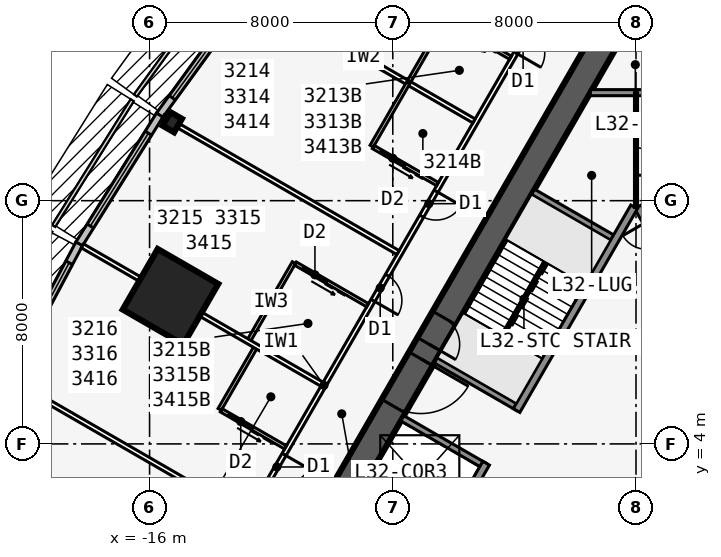
"""IFC4 building model, lengths in metres.
Left out: names, types, materials, properties, quantities, classifications, styles, units other than length and angle.
Written with IfcOpenShell. Run it as: python <this file> out.ifc"""

import sys

from ifc_helpers import new_model, si_unit, direction, frame, frame_2d, origin, origin_2d, place, context, subcontext, project, spatial, rectangle, i_section, extrude, element, fill, save


model = new_model("IFC4")
c1 = context("Model", 3, precision=1e-05, world=origin(), true_north=direction((0.0, 1.0)))
c2 = subcontext(c1, "Body", "Model", "MODEL_VIEW")
j1 = project(units=[si_unit("LENGTHUNIT", "METRE"), si_unit("PLANEANGLEUNIT", "RADIAN")], contexts=[c1])
p1 = place(None, origin())
s1 = spatial("IfcSite", under=j1, at=p1, CompositionType="ELEMENT")
p2 = place(p1, origin())
s2 = spatial("IfcBuilding", under=s1, at=p2, CompositionType="ELEMENT")
p3 = place(p2, frame((0.0, 0.0, 124.9)))
s3 = spatial("IfcBuildingStorey", under=s2, at=p3, CompositionType="ELEMENT", Elevation=124.9)
p4 = place(p3, frame((16.5, -9.526, 0.0), z_axis=(0.0, 0.0, 1.0), x_axis=(-0.499999749417, 0.866025548458, 0.0)))
e1 = element("IfcWall", 1, at=p4, inside=s3, PredefinedType="SHEAR", context=c2, shape_type="SweptSolid", body=[
    extrude(rectangle(XDim=33.0, YDim=0.9, at=frame_2d((16.5, 0.0))), origin(), (0.0, 0.0, 1.0), 3.4),
])
p5 = place(p4, frame((14.15, 0.0, 0.0)))
e2 = element("IfcOpeningElement", 2, at=p5, cuts=e1, PredefinedType="OPENING", context=c2, shape_type="SweptSolid", body=[
    extrude(rectangle(XDim=1.8, YDim=2.13, at=frame_2d((0.9, 1.065))), frame((0.0, 0.46, 0.0), z_axis=(0.0, -1.0, 0.0), x_axis=(1.0, 0.0, 0.0)), (0.0, 0.0, 1.0), 0.92),
])
p6 = place(p4, frame((12.6, 0.0, 0.0)))
e3 = element("IfcOpeningElement", 3, at=p6, cuts=e1, PredefinedType="OPENING", context=c2, shape_type="SweptSolid", body=[
    extrude(rectangle(XDim=1.0, YDim=2.13, at=frame_2d((0.5, 1.065))), frame((0.0, 0.46, 0.0), z_axis=(0.0, -1.0, 0.0), x_axis=(1.0, 0.0, 0.0)), (0.0, 0.0, 1.0), 0.92),
])
p7 = place(p3, frame((5.379, 2.586, 0.0), z_axis=(0.0, 0.0, 1.0), x_axis=(-0.500001375892, 0.866024609411, 0.0)))
e4 = element("IfcWall", 4, at=p7, inside=s3, PredefinedType="SOLIDWALL", context=c2, shape_type="SweptSolid", body=[
    extrude(rectangle(XDim=10.633, YDim=0.25, at=frame_2d((5.316, 0.0))), origin(), (0.0, 0.0, 1.0), 3.235),
])
p8 = place(p7, frame((9.164, 0.0, 0.0)))
e5 = element("IfcOpeningElement", 5, at=p8, cuts=e4, PredefinedType="OPENING", context=c2, shape_type="SweptSolid", body=[
    extrude(rectangle(XDim=0.9, YDim=2.13, at=frame_2d((0.45, 1.065))), frame((0.0, 0.135, 0.0), z_axis=(0.0, -1.0, 0.0), x_axis=(1.0, 0.0, 0.0)), (0.0, 0.0, 1.0), 0.27),
])
p9 = place(p7, frame((1.0, 0.0, 0.0)))
e6 = element("IfcOpeningElement", 6, at=p9, cuts=e4, PredefinedType="OPENING", context=c2, shape_type="SweptSolid", body=[
    extrude(rectangle(XDim=1.1, YDim=2.13, at=frame_2d((0.55, 1.065))), frame((0.0, 0.135, 0.0), z_axis=(0.0, -1.0, 0.0), x_axis=(1.0, 0.0, 0.0)), (0.0, 0.0, 1.0), 0.27),
])
p10 = place(p7, frame((3.9, 0.0, 0.0)))
e7 = element("IfcOpeningElement", 7, at=p10, cuts=e4, PredefinedType="OPENING", context=c2, shape_type="SweptSolid", body=[
    extrude(rectangle(XDim=1.1, YDim=2.13, at=frame_2d((0.55, 1.065))), frame((0.0, 0.135, 0.0), z_axis=(0.0, -1.0, 0.0), x_axis=(1.0, 0.0, 0.0)), (0.0, 0.0, 1.0), 0.27),
])
p11 = place(p7, frame((6.8, 0.0, 0.0)))
e8 = element("IfcOpeningElement", 8, at=p11, cuts=e4, PredefinedType="OPENING", context=c2, shape_type="SweptSolid", body=[
    extrude(rectangle(XDim=1.1, YDim=2.13, at=frame_2d((0.55, 1.065))), frame((0.0, 0.135, 0.0), z_axis=(0.0, -1.0, 0.0), x_axis=(1.0, 0.0, 0.0)), (0.0, 0.0, 1.0), 0.27),
])
p12 = place(p3, frame((0.0, 19.052, 0.0), z_axis=(0.0, 0.0, 1.0), x_axis=(-0.499999749417, -0.866025548458, 0.0)))
e9 = element("IfcWall", 9, at=p12, inside=s3, PredefinedType="SHEAR", context=c2, shape_type="SweptSolid", body=[
    extrude(rectangle(XDim=33.0, YDim=0.9, at=frame_2d((16.5, 0.0))), origin(), (0.0, 0.0, 1.0), 3.4),
])
p13 = place(p12, frame((14.15, 0.0, 0.0)))
e10 = element("IfcOpeningElement", 10, at=p13, cuts=e9, PredefinedType="OPENING", context=c2, shape_type="SweptSolid", body=[
    extrude(rectangle(XDim=1.8, YDim=2.13, at=frame_2d((0.9, 1.065))), frame((0.0, 0.46, 0.0), z_axis=(0.0, -1.0, 0.0), x_axis=(1.0, 0.0, 0.0)), (0.0, 0.0, 1.0), 0.92),
])
p14 = place(p12, frame((12.6, 0.0, 0.0)))
e11 = element("IfcOpeningElement", 11, at=p14, cuts=e9, PredefinedType="OPENING", context=c2, shape_type="SweptSolid", body=[
    extrude(rectangle(XDim=1.0, YDim=2.13, at=frame_2d((0.5, 1.065))), frame((0.0, 0.46, 0.0), z_axis=(0.0, -1.0, 0.0), x_axis=(1.0, 0.0, 0.0)), (0.0, 0.0, 1.0), 0.92),
])
p15 = place(p3, frame((-0.062, 11.794, 0.0), z_axis=(0.0, 0.0, 1.0), x_axis=(-0.500006680225, -0.86602154692, 0.0)))
e12 = element("IfcWall", 12, at=p15, inside=s3, PredefinedType="SOLIDWALL", context=c2, shape_type="SweptSolid", body=[
    extrude(rectangle(XDim=7.733, YDim=0.25, at=frame_2d((3.866, 0.0))), origin(), (0.0, 0.0, 1.0), 3.235),
])
p16 = place(p3, frame((-4.929, 3.365, 0.0), z_axis=(0.0, 0.0, 1.0), x_axis=(-0.499991433582, -0.866030349552, 0.0)))
e13 = element("IfcWall", 13, at=p16, inside=s3, PredefinedType="SOLIDWALL", context=c2, shape_type="SweptSolid", body=[
    extrude(rectangle(XDim=10.633, YDim=0.25, at=frame_2d((5.316, 0.0))), origin(), (0.0, 0.0, 1.0), 3.235),
])
p17 = place(p16, frame((9.164, 0.0, 0.0)))
e14 = element("IfcOpeningElement", 14, at=p17, cuts=e13, PredefinedType="OPENING", context=c2, shape_type="SweptSolid", body=[
    extrude(rectangle(XDim=0.9, YDim=2.13, at=frame_2d((0.45, 1.065))), frame((0.0, 0.135, 0.0), z_axis=(0.0, -1.0, 0.0), x_axis=(1.0, 0.0, 0.0)), (0.0, 0.0, 1.0), 0.27),
])
for number, where, z_axis, x_axis in (
    (15, (-0.679, 10.727, 0.0), (0.0, 0.0, 1.0), (-0.866, 0.5, 0.0)),
    (16, (-3.879, 5.184, 0.0), (0.0, 0.0, 1.0), (-0.866, 0.5, 0.0)),
    (17, (-4.979, 3.279, 0.0), (0.0, 0.0, 1.0), (-0.866, 0.5, 0.0)),
):
    element("IfcWall", number, at=place(p3, frame(where, z_axis=z_axis, x_axis=x_axis)), inside=s3, PredefinedType="SOLIDWALL", context=c2, shape_type="SweptSolid", body=[
        extrude(rectangle(XDim=3.125, YDim=0.2, at=frame_2d((1.562, 0.0))), origin(), (0.0, 0.0, 1.0), 3.235),
    ])
p18 = place(p3, frame((-15.254, 14.58, 0.0), z_axis=(0.0, 0.0, 1.0), x_axis=(-0.866025403784, 0.5, 0.0)))
e18 = element("IfcColumn", 18, at=p18, inside=s3, PredefinedType="COLUMN", context=c2, shape_type="SweptSolid", body=[
    extrude(i_section(OverallWidth=0.437, OverallDepth=0.513, WebThickness=0.061, FlangeThickness=0.097, at=origin_2d()), origin(), (0.0, 0.0, 1.0), 3.4),
])
p19 = place(p3, frame((-15.312, 8.84, 0.0), z_axis=(0.0, 0.0, 1.0), x_axis=(-0.866025403784, 0.5, 0.0)))
e19 = element("IfcColumn", 19, at=p19, inside=s3, PredefinedType="COLUMN", context=c2, shape_type="SweptSolid", body=[
    extrude(rectangle(XDim=2.3, YDim=2.3, at=origin_2d()), origin(), (0.0, 0.0, 1.0), 3.4),
])
p20 = place(p3, frame((-12.718, 18.875, 0.0), z_axis=(0.0, 0.0, 1.0), x_axis=(-0.587669188412, -0.809101307001, 0.0)))
e20 = element("IfcWall", 20, at=p20, inside=s3, PredefinedType="STANDARD", context=c2, shape_type="SweptSolid", body=[
    extrude(rectangle(XDim=5.028, YDim=0.25, at=frame_2d((2.514, 0.0))), origin(), (0.0, 0.0, 1.0), 3.235),
])
p21 = place(p20, frame((0.714, 0.0, 0.45)))
e21 = element("IfcOpeningElement", 21, at=p21, cuts=e20, PredefinedType="OPENING", context=c2, shape_type="SweptSolid", body=[
    extrude(rectangle(XDim=3.6, YDim=2.4, at=frame_2d((1.8, 1.2))), frame((0.0, 0.135, 0.0), z_axis=(0.0, -1.0, 0.0), x_axis=(1.0, 0.0, 0.0)), (0.0, 0.0, 1.0), 0.27),
])
p22 = place(p3, frame((-15.667, 14.814, 0.0), z_axis=(0.0, 0.0, 1.0), x_axis=(-0.529990167382, -0.84800378683, 0.0)))
e22 = element("IfcWall", 22, at=p22, inside=s3, PredefinedType="STANDARD", context=c2, shape_type="SweptSolid", body=[
    extrude(rectangle(XDim=5.003, YDim=0.25, at=frame_2d((2.501, 0.0))), origin(), (0.0, 0.0, 1.0), 3.235),
])
p23 = place(p22, frame((0.701, 0.0, 0.45)))
e23 = element("IfcOpeningElement", 23, at=p23, cuts=e22, PredefinedType="OPENING", context=c2, shape_type="SweptSolid", body=[
    extrude(rectangle(XDim=3.6, YDim=2.4, at=frame_2d((1.8, 1.2))), frame((0.0, 0.135, 0.0), z_axis=(0.0, -1.0, 0.0), x_axis=(1.0, 0.0, 0.0)), (0.0, 0.0, 1.0), 0.27),
])
p24 = place(p3, frame((-18.314, 10.579, 0.0), z_axis=(0.0, 0.0, 1.0), x_axis=(-0.469404966864, -0.882982999317, 0.0)))
e24 = element("IfcWall", 24, at=p24, inside=s3, PredefinedType="STANDARD", context=c2, shape_type="SweptSolid", body=[
    extrude(rectangle(XDim=5.003, YDim=0.25, at=frame_2d((2.501, 0.0))), origin(), (0.0, 0.0, 1.0), 3.235),
])
p25 = place(p24, frame((0.701, 0.0, 0.45)))
e25 = element("IfcOpeningElement", 25, at=p25, cuts=e24, PredefinedType="OPENING", context=c2, shape_type="SweptSolid", body=[
    extrude(rectangle(XDim=3.6, YDim=2.4, at=frame_2d((1.8, 1.2))), frame((0.0, 0.135, 0.0), z_axis=(0.0, -1.0, 0.0), x_axis=(1.0, 0.0, 0.0)), (0.0, 0.0, 1.0), 0.27),
])
p26 = place(p3, frame((-0.5, 22.836, 0.0), z_axis=(0.0, 0.0, 1.0), x_axis=(-0.500001677587, -0.866024435227, 0.0)))
e26 = element("IfcWall", 26, at=p26, inside=s3, PredefinedType="PARTITIONING", context=c2, shape_type="SweptSolid", body=[
    extrude(rectangle(XDim=39.054, YDim=0.15, at=frame_2d((19.527, 0.0))), origin(), (0.0, 0.0, 1.0), 3.235),
])
p27 = place(p26, frame((0.352, 0.0, 0.0)))
e27 = element("IfcOpeningElement", 27, at=p27, cuts=e26, PredefinedType="OPENING", context=c2, shape_type="SweptSolid", body=[
    extrude(rectangle(XDim=0.95, YDim=2.13, at=frame_2d((0.475, 1.065))), frame((0.0, 0.085, 0.0), z_axis=(0.0, -1.0, 0.0), x_axis=(1.0, 0.0, 0.0)), (0.0, 0.0, 1.0), 0.17),
])
p28 = place(p26, frame((5.952, 0.0, 0.0)))
e28 = element("IfcOpeningElement", 28, at=p28, cuts=e26, PredefinedType="OPENING", context=c2, shape_type="SweptSolid", body=[
    extrude(rectangle(XDim=0.95, YDim=2.13, at=frame_2d((0.475, 1.065))), frame((0.0, 0.085, 0.0), z_axis=(0.0, -1.0, 0.0), x_axis=(1.0, 0.0, 0.0)), (0.0, 0.0, 1.0), 0.17),
])
p29 = place(p26, frame((12.152, 0.0, 0.0)))
e29 = element("IfcOpeningElement", 29, at=p29, cuts=e26, PredefinedType="OPENING", context=c2, shape_type="SweptSolid", body=[
    extrude(rectangle(XDim=0.95, YDim=2.13, at=frame_2d((0.475, 1.065))), frame((0.0, 0.085, 0.0), z_axis=(0.0, -1.0, 0.0), x_axis=(1.0, 0.0, 0.0)), (0.0, 0.0, 1.0), 0.17),
])
p30 = place(p26, frame((15.352, 0.0, 0.0)))
e30 = element("IfcOpeningElement", 30, at=p30, cuts=e26, PredefinedType="OPENING", context=c2, shape_type="SweptSolid", body=[
    extrude(rectangle(XDim=0.95, YDim=2.13, at=frame_2d((0.475, 1.065))), frame((0.0, 0.085, 0.0), z_axis=(0.0, -1.0, 0.0), x_axis=(1.0, 0.0, 0.0)), (0.0, 0.0, 1.0), 0.17),
])
p31 = place(p26, frame((22.152, 0.0, 0.0)))
e31 = element("IfcOpeningElement", 31, at=p31, cuts=e26, PredefinedType="OPENING", context=c2, shape_type="SweptSolid", body=[
    extrude(rectangle(XDim=0.95, YDim=2.13, at=frame_2d((0.475, 1.065))), frame((0.0, 0.085, 0.0), z_axis=(0.0, -1.0, 0.0), x_axis=(1.0, 0.0, 0.0)), (0.0, 0.0, 1.0), 0.17),
])
p32 = place(p26, frame((30.352, 0.0, 0.0)))
e32 = element("IfcOpeningElement", 32, at=p32, cuts=e26, PredefinedType="OPENING", context=c2, shape_type="SweptSolid", body=[
    extrude(rectangle(XDim=0.95, YDim=2.13, at=frame_2d((0.475, 1.065))), frame((0.0, 0.085, 0.0), z_axis=(0.0, -1.0, 0.0), x_axis=(1.0, 0.0, 0.0)), (0.0, 0.0, 1.0), 0.17),
])
p33 = place(p26, frame((37.752, 0.0, 0.0)))
e33 = element("IfcOpeningElement", 33, at=p33, cuts=e26, PredefinedType="OPENING", context=c2, shape_type="SweptSolid", body=[
    extrude(rectangle(XDim=0.95, YDim=2.13, at=frame_2d((0.475, 1.065))), frame((0.0, 0.085, 0.0), z_axis=(0.0, -1.0, 0.0), x_axis=(1.0, 0.0, 0.0)), (0.0, 0.0, 1.0), 0.17),
])
p34 = place(p3, frame((-5.329, 14.623, 0.0), z_axis=(0.0, 0.0, 1.0), x_axis=(-0.866011723728, 0.500023693804, 0.0)))
e34 = element("IfcWall", 34, at=p34, inside=s3, PredefinedType="PARTITIONING", context=c2, shape_type="SweptSolid", body=[
    extrude(rectangle(XDim=8.395, YDim=0.15, at=frame_2d((4.198, 0.0))), origin(), (0.0, 0.0, 1.0), 2.389),
])
p35 = place(p3, frame((-7.829, 10.293, 0.0), z_axis=(0.0, 0.0, 1.0), x_axis=(-0.866027015393, 0.499997208602, 0.0)))
e35 = element("IfcWall", 35, at=p35, inside=s3, PredefinedType="PARTITIONING", context=c2, shape_type="SweptSolid", body=[
    extrude(rectangle(XDim=8.922, YDim=0.15, at=frame_2d((4.461, 0.0))), origin(), (0.0, 0.0, 1.0), 2.389),
])
p36 = place(p3, frame((-10.329, 5.963, 0.0), z_axis=(0.0, 0.0, 1.0), x_axis=(-0.866025170687, 0.500000403736, 0.0)))
e36 = element("IfcWall", 36, at=p36, inside=s3, PredefinedType="PARTITIONING", context=c2, shape_type="SweptSolid", body=[
    extrude(rectangle(XDim=9.099, YDim=0.15, at=frame_2d((4.549, 0.0))), origin(), (0.0, 0.0, 1.0), 2.389),
])
p37 = place(p3, frame((-12.829, 1.633, 0.0), z_axis=(0.0, 0.0, 1.0), x_axis=(-0.866027015393, 0.499997208602, 0.0)))
e37 = element("IfcWall", 37, at=p37, inside=s3, PredefinedType="PARTITIONING", context=c2, shape_type="SweptSolid", body=[
    extrude(rectangle(XDim=8.922, YDim=0.15, at=frame_2d((4.461, 0.0))), origin(), (0.0, 0.0, 1.0), 2.389),
])
p38 = place(p3, frame((-6.293, 17.952, 0.0), z_axis=(0.0, 0.0, 1.0), x_axis=(-0.499957262057, -0.866050077142, 0.0)))
e38 = element("IfcWall", 38, at=p38, inside=s3, PredefinedType="PLUMBINGWALL", context=c2, shape_type="SweptSolid", body=[
    extrude(rectangle(XDim=2.4, YDim=0.12, at=frame_2d((1.2, 0.0))), origin(), (0.0, 0.0, 1.0), 3.235),
])
p39 = place(p3, frame((-4.128, 16.702, 0.0), z_axis=(0.0, 0.0, 1.0), x_axis=(-0.866048967903, 0.499959183527, 0.0)))
e39 = element("IfcWall", 39, at=p39, inside=s3, PredefinedType="PLUMBINGWALL", context=c2, shape_type="SweptSolid", body=[
    extrude(rectangle(XDim=2.44, YDim=0.12, at=frame_2d((1.22, 0.0))), origin(), (0.0, 0.0, 1.0), 3.235),
])
p40 = place(p39, frame((1.25, 0.0, 0.0)))
e40 = element("IfcOpeningElement", 40, at=p40, cuts=e39, PredefinedType="OPENING", context=c2, shape_type="SweptSolid", body=[
    extrude(rectangle(XDim=0.9, YDim=2.13, at=frame_2d((0.45, 1.065))), frame((0.0, 0.07, 0.0), z_axis=(0.0, -1.0, 0.0), x_axis=(1.0, 0.0, 0.0)), (0.0, 0.0, 1.0), 0.14),
])
p41 = place(p3, frame((-7.493, 15.873, 0.0), z_axis=(0.0, 0.0, 1.0), x_axis=(-0.500077600433, -0.865980596518, 0.0)))
e41 = element("IfcWall", 41, at=p41, inside=s3, PredefinedType="PLUMBINGWALL", context=c2, shape_type="SweptSolid", body=[
    extrude(rectangle(XDim=2.4, YDim=0.12, at=frame_2d((1.2, 0.0))), origin(), (0.0, 0.0, 1.0), 3.235),
])
p42 = place(p3, frame((-6.529, 12.545, 0.0), z_axis=(0.0, 0.0, 1.0), x_axis=(-0.866023955769, 0.500002508028, 0.0)))
e42 = element("IfcWall", 42, at=p42, inside=s3, PredefinedType="PLUMBINGWALL", context=c2, shape_type="SweptSolid", body=[
    extrude(rectangle(XDim=2.44, YDim=0.12, at=frame_2d((1.22, 0.0))), origin(), (0.0, 0.0, 1.0), 3.235),
])
p43 = place(p42, frame((1.25, 0.0, 0.0)))
e43 = element("IfcOpeningElement", 43, at=p43, cuts=e42, PredefinedType="OPENING", context=c2, shape_type="SweptSolid", body=[
    extrude(rectangle(XDim=0.9, YDim=2.13, at=frame_2d((0.45, 1.065))), frame((0.0, 0.07, 0.0), z_axis=(0.0, -1.0, 0.0), x_axis=(1.0, 0.0, 0.0)), (0.0, 0.0, 1.0), 0.14),
])
p44 = place(p3, frame((-11.253, 9.961, 0.0), z_axis=(0.0, 0.0, 1.0), x_axis=(-0.499990139034, -0.866031096941, 0.0)))
e44 = element("IfcWall", 44, at=p44, inside=s3, PredefinedType="PLUMBINGWALL", context=c2, shape_type="SweptSolid", body=[
    extrude(rectangle(XDim=3.0, YDim=0.12, at=frame_2d((1.5, 0.0))), origin(), (0.0, 0.0, 1.0), 3.235),
])
p45 = place(p3, frame((-8.829, 8.561, 0.0), z_axis=(0.0, 0.0, 1.0), x_axis=(-0.866035715982, 0.499982138324, 0.0)))
e45 = element("IfcWall", 45, at=p45, inside=s3, PredefinedType="PLUMBINGWALL", context=c2, shape_type="SweptSolid", body=[
    extrude(rectangle(XDim=2.74, YDim=0.12, at=frame_2d((1.37, 0.0))), origin(), (0.0, 0.0, 1.0), 3.235),
])
p46 = place(p45, frame((1.55, 0.0, 0.0)))
e46 = element("IfcOpeningElement", 46, at=p46, cuts=e45, PredefinedType="OPENING", context=c2, shape_type="SweptSolid", body=[
    extrude(rectangle(XDim=0.9, YDim=2.13, at=frame_2d((0.45, 1.065))), frame((0.0, 0.07, 0.0), z_axis=(0.0, -1.0, 0.0), x_axis=(1.0, 0.0, 0.0)), (0.0, 0.0, 1.0), 0.14),
])
p47 = place(p3, frame((-12.493, 7.213, 0.0), z_axis=(0.0, 0.0, 1.0), x_axis=(-0.500077600433, -0.865980596518, 0.0)))
e47 = element("IfcWall", 47, at=p47, inside=s3, PredefinedType="PLUMBINGWALL", context=c2, shape_type="SweptSolid", body=[
    extrude(rectangle(XDim=2.4, YDim=0.12, at=frame_2d((1.2, 0.0))), origin(), (0.0, 0.0, 1.0), 3.235),
])
p48 = place(p3, frame((-11.529, 3.885, 0.0), z_axis=(0.0, 0.0, 1.0), x_axis=(-0.866023955769, 0.500002508028, 0.0)))
e48 = element("IfcWall", 48, at=p48, inside=s3, PredefinedType="PLUMBINGWALL", context=c2, shape_type="SweptSolid", body=[
    extrude(rectangle(XDim=2.44, YDim=0.12, at=frame_2d((1.22, 0.0))), origin(), (0.0, 0.0, 1.0), 3.235),
])
p49 = place(p48, frame((1.25, 0.0, 0.0)))
e49 = element("IfcOpeningElement", 49, at=p49, cuts=e48, PredefinedType="OPENING", context=c2, shape_type="SweptSolid", body=[
    extrude(rectangle(XDim=0.9, YDim=2.13, at=frame_2d((0.45, 1.065))), frame((0.0, 0.07, 0.0), z_axis=(0.0, -1.0, 0.0), x_axis=(1.0, 0.0, 0.0)), (0.0, 0.0, 1.0), 0.14),
])
p50 = place(p3, frame((-1.501, 15.552, 0.0), z_axis=(0.0, 0.0, 1.0), x_axis=(1.0, 0.0, 0.0)))
e50 = element("IfcWall", 50, at=p50, inside=s3, PredefinedType="SOLIDWALL", context=c2, shape_type="SweptSolid", body=[
    extrude(rectangle(XDim=3.002, YDim=0.2, at=frame_2d((1.501, 0.0))), origin(), (0.0, 0.0, 1.0), 3.235),
])
p51 = place(p3, frame((0.0, 15.552, 0.0), z_axis=(0.0, 0.0, 1.0), x_axis=(0.0, -1.0, 0.0)))
e51 = element("IfcWall", 51, at=p51, inside=s3, PredefinedType="PARTITIONING", context=c2, shape_type="SweptSolid", body=[
    extrude(rectangle(XDim=3.775, YDim=0.1, at=frame_2d((1.888, 0.0))), origin(), (0.0, 0.0, 1.0), 3.235),
])
p52 = place(p51, frame((1.815, 0.0, 0.0)))
e52 = element("IfcOpeningElement", 52, at=p52, cuts=e51, PredefinedType="OPENING", context=c2, shape_type="SweptSolid", body=[
    extrude(rectangle(XDim=0.9, YDim=2.13, at=frame_2d((0.45, 1.065))), frame((0.0, 0.06, 0.0), z_axis=(0.0, -1.0, 0.0), x_axis=(1.0, 0.0, 0.0)), (0.0, 0.0, 1.0), 0.12),
])
p53 = place(p3, frame((-2.988, 9.978, 0.0), z_axis=(0.0, 0.0, 1.0), x_axis=(-0.499992232847, -0.866029888106, 0.0)))
e53 = element("IfcWall", 53, at=p53, inside=s3, PredefinedType="SOLIDWALL", context=c2, shape_type="SweptSolid", body=[
    extrude(rectangle(XDim=2.794, YDim=0.1, at=frame_2d((1.397, 0.0))), origin(), (0.0, 0.0, 1.0), 3.4),
])
p54 = place(p21, origin())
e54 = element("IfcWindow", 54, at=p54, inside=s3, PartitioningType="SINGLE_PANEL", PredefinedType="WINDOW", context=c2, shape_type="SweptSolid", body=[
    extrude(rectangle(XDim=3.6, YDim=2.4, at=frame_2d((1.8, 1.2))), frame((0.0, 0.03, 0.0), z_axis=(0.0, -1.0, 0.0), x_axis=(1.0, 0.0, 0.0)), (0.0, 0.0, 1.0), 0.06),
])
fill(e21, e54)
p55 = place(p23, origin())
e55 = element("IfcWindow", 55, at=p55, inside=s3, PartitioningType="SINGLE_PANEL", PredefinedType="WINDOW", context=c2, shape_type="SweptSolid", body=[
    extrude(rectangle(XDim=3.6, YDim=2.4, at=frame_2d((1.8, 1.2))), frame((0.0, 0.03, 0.0), z_axis=(0.0, -1.0, 0.0), x_axis=(1.0, 0.0, 0.0)), (0.0, 0.0, 1.0), 0.06),
])
fill(e23, e55)
p56 = place(p25, origin())
e56 = element("IfcWindow", 56, at=p56, inside=s3, PartitioningType="SINGLE_PANEL", PredefinedType="WINDOW", context=c2, shape_type="SweptSolid", body=[
    extrude(rectangle(XDim=3.6, YDim=2.4, at=frame_2d((1.8, 1.2))), frame((0.0, 0.03, 0.0), z_axis=(0.0, -1.0, 0.0), x_axis=(1.0, 0.0, 0.0)), (0.0, 0.0, 1.0), 0.06),
])
fill(e25, e56)
p57 = place(p28, origin())
e57 = element("IfcDoor", 57, at=p57, inside=s3, OperationType="SINGLE_SWING_RIGHT", PredefinedType="DOOR", context=c2, shape_type="SweptSolid", body=[
    extrude(rectangle(XDim=0.95, YDim=2.13, at=frame_2d((0.475, 1.065))), frame((0.0, 0.025, 0.0), z_axis=(0.0, -1.0, 0.0), x_axis=(1.0, 0.0, 0.0)), (0.0, 0.0, 1.0), 0.05),
])
fill(e28, e57)
p58 = place(p43, origin())
e58 = element("IfcDoor", 58, at=p58, inside=s3, OperationType="SLIDING_TO_LEFT", PredefinedType="DOOR", context=c2, shape_type="SweptSolid", body=[
    extrude(rectangle(XDim=0.9, YDim=2.13, at=frame_2d((0.45, 1.065))), frame((0.0, 0.025, 0.0), z_axis=(0.0, -1.0, 0.0), x_axis=(1.0, 0.0, 0.0)), (0.0, 0.0, 1.0), 0.05),
])
fill(e43, e58)
p59 = place(p29, origin())
e59 = element("IfcDoor", 59, at=p59, inside=s3, OperationType="SINGLE_SWING_LEFT", PredefinedType="DOOR", context=c2, shape_type="SweptSolid", body=[
    extrude(rectangle(XDim=0.95, YDim=2.13, at=frame_2d((0.475, 1.065))), frame((0.0, 0.025, 0.0), z_axis=(0.0, -1.0, 0.0), x_axis=(1.0, 0.0, 0.0)), (0.0, 0.0, 1.0), 0.05),
])
fill(e29, e59)
p60 = place(p46, origin())
e60 = element("IfcDoor", 60, at=p60, inside=s3, OperationType="SLIDING_TO_LEFT", PredefinedType="DOOR", context=c2, shape_type="SweptSolid", body=[
    extrude(rectangle(XDim=0.9, YDim=2.13, at=frame_2d((0.45, 1.065))), frame((0.0, 0.025, 0.0), z_axis=(0.0, -1.0, 0.0), x_axis=(1.0, 0.0, 0.0)), (0.0, 0.0, 1.0), 0.05),
])
fill(e46, e60)
p61 = place(p30, origin())
e61 = element("IfcDoor", 61, at=p61, inside=s3, OperationType="SINGLE_SWING_RIGHT", PredefinedType="DOOR", context=c2, shape_type="SweptSolid", body=[
    extrude(rectangle(XDim=0.95, YDim=2.13, at=frame_2d((0.475, 1.065))), frame((0.0, 0.025, 0.0), z_axis=(0.0, -1.0, 0.0), x_axis=(1.0, 0.0, 0.0)), (0.0, 0.0, 1.0), 0.05),
])
fill(e30, e61)
p62 = place(p49, origin())
e62 = element("IfcDoor", 62, at=p62, inside=s3, OperationType="SLIDING_TO_LEFT", PredefinedType="DOOR", context=c2, shape_type="SweptSolid", body=[
    extrude(rectangle(XDim=0.9, YDim=2.13, at=frame_2d((0.45, 1.065))), frame((0.0, 0.025, 0.0), z_axis=(0.0, -1.0, 0.0), x_axis=(1.0, 0.0, 0.0)), (0.0, 0.0, 1.0), 0.05),
])
fill(e49, e62)
p63 = place(p31, origin())
e63 = element("IfcDoor", 63, at=p63, inside=s3, OperationType="SINGLE_SWING_LEFT", PredefinedType="DOOR", context=c2, shape_type="SweptSolid", body=[
    extrude(rectangle(XDim=0.95, YDim=2.13, at=frame_2d((0.475, 1.065))), frame((0.0, 0.025, 0.0), z_axis=(0.0, -1.0, 0.0), x_axis=(1.0, 0.0, 0.0)), (0.0, 0.0, 1.0), 0.05),
])
fill(e31, e63)
p64 = place(p13, origin())
e64 = element("IfcDoor", 64, at=p64, inside=s3, OperationType="DOUBLE_DOOR_SINGLE_SWING", PredefinedType="DOOR", context=c2, shape_type="SweptSolid", body=[
    extrude(rectangle(XDim=1.8, YDim=2.13, at=frame_2d((0.9, 1.065))), frame((0.0, 0.025, 0.0), z_axis=(0.0, -1.0, 0.0), x_axis=(1.0, 0.0, 0.0)), (0.0, 0.0, 1.0), 0.05),
])
fill(e10, e64)
p65 = place(p14, origin())
e65 = element("IfcDoor", 65, at=p65, inside=s3, OperationType="SINGLE_SWING_RIGHT", PredefinedType="DOOR", context=c2, shape_type="SweptSolid", body=[
    extrude(rectangle(XDim=1.0, YDim=2.13, at=frame_2d((0.5, 1.065))), frame((0.0, 0.025, 0.0), z_axis=(0.0, -1.0, 0.0), x_axis=(1.0, 0.0, 0.0)), (0.0, 0.0, 1.0), 0.05),
])
fill(e11, e65)
p66 = place(p52, origin())
e66 = element("IfcDoor", 66, at=p66, inside=s3, OperationType="SINGLE_SWING_RIGHT", PredefinedType="DOOR", context=c2, shape_type="SweptSolid", body=[
    extrude(rectangle(XDim=0.9, YDim=2.13, at=frame_2d((0.45, 1.065))), frame((0.0, 0.025, 0.0), z_axis=(0.0, -1.0, 0.0), x_axis=(1.0, 0.0, 0.0)), (0.0, 0.0, 1.0), 0.05),
])
fill(e52, e66)
save(model, sys.argv[1])
